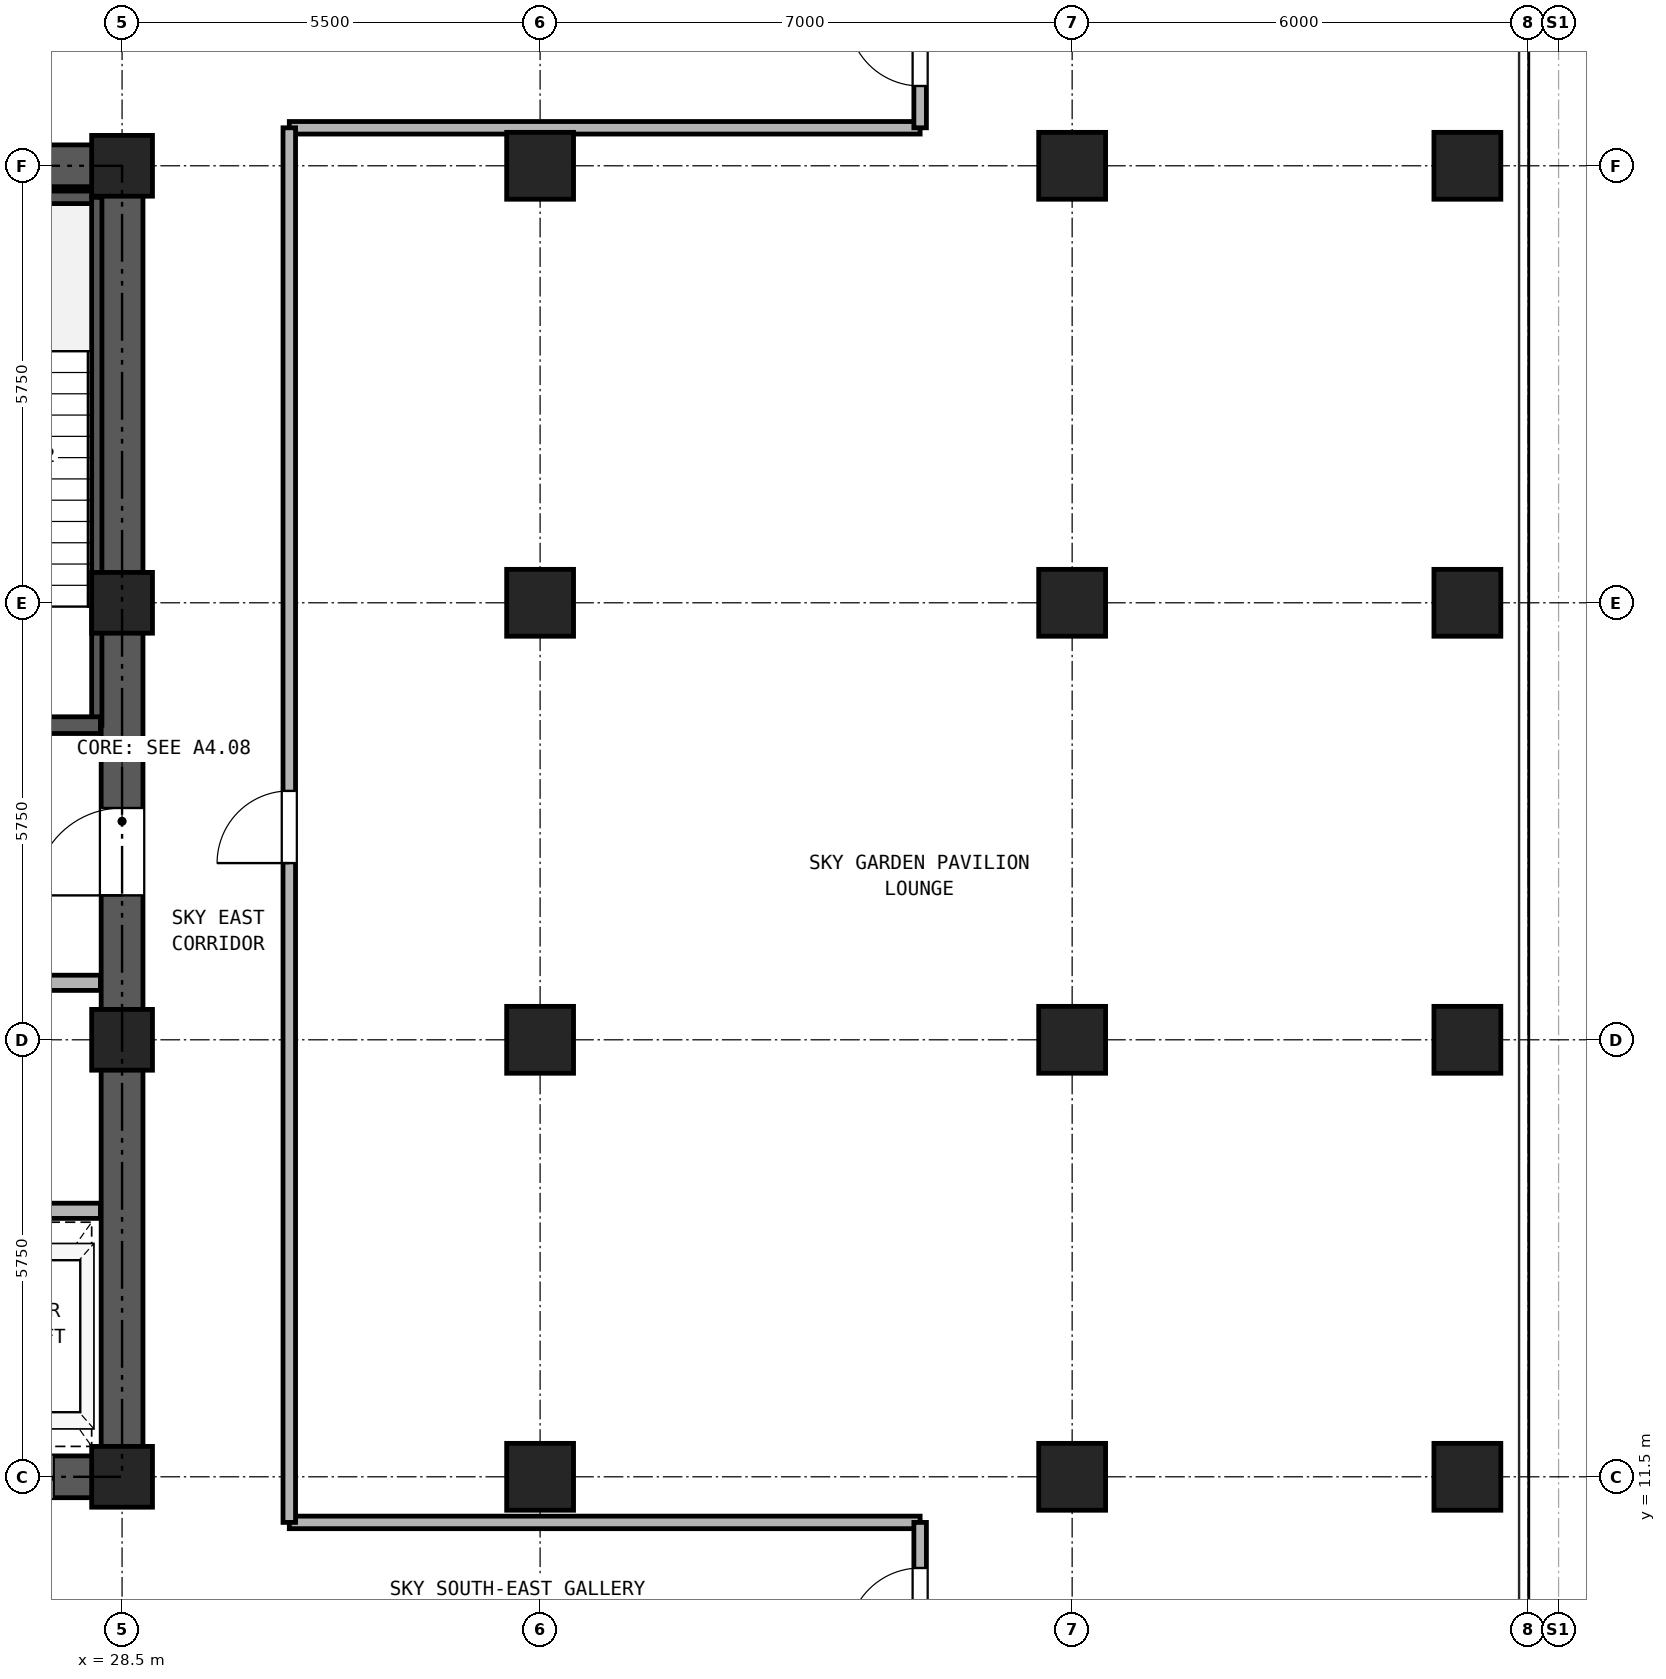
"""IFC4 building model, lengths in metres.
Left out: names, types, materials, properties, quantities, classifications, styles, units other than length and angle.
Written with IfcOpenShell. Run it as: python <this file> out.ifc"""

import sys

from ifc_helpers import new_model, si_unit, direction, frame, frame_2d, origin, origin_2d, place, context, subcontext, project, spatial, rectangle, hollow_rectangle, extrude, source, transform, mapped, element, fill, save


model = new_model("IFC4")
c1 = context("Model", 3, precision=1e-05, world=origin(), true_north=direction((0.0, 1.0)))
c2 = subcontext(c1, "Body", "Model", "MODEL_VIEW")
j1 = project(units=[si_unit("LENGTHUNIT", "METRE"), si_unit("PLANEANGLEUNIT", "RADIAN")], contexts=[c1])
p1 = place(None, origin())
s1 = spatial("IfcSite", under=j1, at=p1, CompositionType="ELEMENT")
p2 = place(p1, origin())
s2 = spatial("IfcBuilding", under=s1, at=p2, CompositionType="ELEMENT")
p3 = place(p2, frame((0.0, 0.0, 88.2)))
s3 = spatial("IfcBuildingStorey", under=s2, at=p3, CompositionType="ELEMENT", Elevation=88.2)
m1 = source(origin(), c2, "Body", "SweptSolid", [
    extrude(hollow_rectangle(XDim=0.88, YDim=0.88, WallThickness=0.05, at=origin_2d()), origin(), (0.0, 0.0, 1.0), 4.25),
])
for number, where, z_axis, x_axis in (
    (1, (46.2, 11.5, 0.0), (0.0, 0.0, 1.0), (1.0, 0.0, 0.0)),
    (2, (46.2, 17.25, 0.0), (0.0, 0.0, 1.0), (1.0, 0.0, 0.0)),
    (3, (46.2, 23.0, 0.0), (0.0, 0.0, 1.0), (1.0, 0.0, 0.0)),
    (4, (46.2, 28.75, 0.0), (0.0, 0.0, 1.0), (1.0, 0.0, 0.0)),
):
    element("IfcColumn", number, at=place(p3, frame(where, z_axis=z_axis, x_axis=x_axis)), inside=s3, PredefinedType="COLUMN", context=c2, shape_type="MappedRepresentation", body=[
        mapped(m1, transform((0.0, 0.0, 0.0), x_axis=(1.0, 0.0, 0.0), y_axis=(0.0, 1.0, 0.0), z_axis=(0.0, 0.0, 1.0), scale=1.0)),
    ])
m2 = source(origin(), c2, "Body", "SweptSolid", [
    extrude(hollow_rectangle(XDim=0.8, YDim=0.8, WallThickness=0.045, at=origin_2d()), origin(), (0.0, 0.0, 1.0), 4.25),
])
for number, where, z_axis, x_axis in (
    (5, (28.5, 11.5, 0.0), (0.0, 0.0, 1.0), (1.0, 0.0, 0.0)),
    (6, (28.5, 17.25, 0.0), (0.0, 0.0, 1.0), (1.0, 0.0, 0.0)),
    (7, (28.5, 23.0, 0.0), (0.0, 0.0, 1.0), (1.0, 0.0, 0.0)),
    (8, (28.5, 28.75, 0.0), (0.0, 0.0, 1.0), (1.0, 0.0, 0.0)),
):
    element("IfcColumn", number, at=place(p3, frame(where, z_axis=z_axis, x_axis=x_axis)), inside=s3, PredefinedType="COLUMN", context=c2, shape_type="MappedRepresentation", body=[
        mapped(m2, transform((0.0, 0.0, 0.0), x_axis=(1.0, 0.0, 0.0), y_axis=(0.0, 1.0, 0.0), z_axis=(0.0, 0.0, 1.0), scale=1.0)),
    ])
for number, where, z_axis, x_axis in (
    (9, (34.0, 11.5, 0.0), (0.0, 0.0, 1.0), (1.0, 0.0, 0.0)),
    (10, (34.0, 17.25, 0.0), (0.0, 0.0, 1.0), (1.0, 0.0, 0.0)),
    (11, (34.0, 23.0, 0.0), (0.0, 0.0, 1.0), (1.0, 0.0, 0.0)),
    (12, (34.0, 28.75, 0.0), (0.0, 0.0, 1.0), (1.0, 0.0, 0.0)),
    (13, (41.0, 11.5, 0.0), (0.0, 0.0, 1.0), (1.0, 0.0, 0.0)),
    (14, (41.0, 17.25, 0.0), (0.0, 0.0, 1.0), (1.0, 0.0, 0.0)),
    (15, (41.0, 23.0, 0.0), (0.0, 0.0, 1.0), (1.0, 0.0, 0.0)),
    (16, (41.0, 28.75, 0.0), (0.0, 0.0, 1.0), (1.0, 0.0, 0.0)),
):
    element("IfcColumn", number, at=place(p3, frame(where, z_axis=z_axis, x_axis=x_axis)), inside=s3, PredefinedType="COLUMN", context=c2, shape_type="MappedRepresentation", body=[
        mapped(m1, transform((0.0, 0.0, 0.0), x_axis=(1.0, 0.0, 0.0), y_axis=(0.0, 1.0, 0.0), z_axis=(0.0, 0.0, 1.0), scale=1.0)),
    ])
p4 = place(p3, frame((18.225, 11.5, 0.0), z_axis=(0.0, 0.0, 1.0), x_axis=(1.0, 0.0, 0.0)))
e17 = element("IfcWall", 17, at=p4, inside=s3, PredefinedType="SHEAR", context=c2, shape_type="SweptSolid", body=[
    extrude(rectangle(XDim=10.55, YDim=0.55, at=frame_2d((5.275, 0.0))), origin(), (0.0, 0.0, 1.0), 4.25),
])
p5 = place(p4, frame((1.145, 0.0, 0.0)))
e18 = element("IfcOpeningElement", 18, at=p5, cuts=e17, PredefinedType="OPENING", context=c2, shape_type="SweptSolid", body=[
    extrude(rectangle(XDim=1.1, YDim=2.25, at=frame_2d((0.55, 1.125))), frame((0.0, 0.285, 0.0), z_axis=(0.0, -1.0, 0.0), x_axis=(1.0, 0.0, 0.0)), (0.0, 0.0, 1.0), 0.57),
])
p6 = place(p4, frame((3.445, 0.0, 0.0)))
e19 = element("IfcOpeningElement", 19, at=p6, cuts=e17, PredefinedType="OPENING", context=c2, shape_type="SweptSolid", body=[
    extrude(rectangle(XDim=1.1, YDim=2.25, at=frame_2d((0.55, 1.125))), frame((0.0, 0.285, 0.0), z_axis=(0.0, -1.0, 0.0), x_axis=(1.0, 0.0, 0.0)), (0.0, 0.0, 1.0), 0.57),
])
p7 = place(p4, frame((5.875, 0.0, 0.0)))
e20 = element("IfcOpeningElement", 20, at=p7, cuts=e17, PredefinedType="OPENING", context=c2, shape_type="SweptSolid", body=[
    extrude(rectangle(XDim=1.1, YDim=2.25, at=frame_2d((0.55, 1.125))), frame((0.0, 0.285, 0.0), z_axis=(0.0, -1.0, 0.0), x_axis=(1.0, 0.0, 0.0)), (0.0, 0.0, 1.0), 0.57),
])
p8 = place(p4, frame((8.275, 0.0, 0.0)))
e21 = element("IfcOpeningElement", 21, at=p8, cuts=e17, PredefinedType="OPENING", context=c2, shape_type="SweptSolid", body=[
    extrude(rectangle(XDim=1.1, YDim=2.25, at=frame_2d((0.55, 1.125))), frame((0.0, 0.285, 0.0), z_axis=(0.0, -1.0, 0.0), x_axis=(1.0, 0.0, 0.0)), (0.0, 0.0, 1.0), 0.57),
])
p9 = place(p3, frame((18.225, 28.75, 0.0), z_axis=(0.0, 0.0, 1.0), x_axis=(1.0, 0.0, 0.0)))
e22 = element("IfcWall", 22, at=p9, inside=s3, PredefinedType="SHEAR", context=c2, shape_type="SweptSolid", body=[
    extrude(rectangle(XDim=10.55, YDim=0.55, at=frame_2d((5.275, 0.0))), origin(), (0.0, 0.0, 1.0), 4.25),
])
p10 = place(p9, frame((4.155, 0.0, 0.0)))
e23 = element("IfcOpeningElement", 23, at=p10, cuts=e22, PredefinedType="OPENING", context=c2, shape_type="SweptSolid", body=[
    extrude(rectangle(XDim=0.9, YDim=2.05, at=frame_2d((0.45, 1.025))), frame((0.0, 0.285, 0.0), z_axis=(0.0, -1.0, 0.0), x_axis=(1.0, 0.0, 0.0)), (0.0, 0.0, 1.0), 0.57),
])
p11 = place(p9, frame((5.695, 0.0, 0.0)))
e24 = element("IfcOpeningElement", 24, at=p11, cuts=e22, PredefinedType="OPENING", context=c2, shape_type="SweptSolid", body=[
    extrude(rectangle(XDim=0.9, YDim=2.05, at=frame_2d((0.45, 1.025))), frame((0.0, 0.285, 0.0), z_axis=(0.0, -1.0, 0.0), x_axis=(1.0, 0.0, 0.0)), (0.0, 0.0, 1.0), 0.57),
])
p12 = place(p3, frame((28.5, 11.775, 0.0), z_axis=(0.0, 0.0, 1.0), x_axis=(0.0, 1.0, 0.0)))
e25 = element("IfcWall", 25, at=p12, inside=s3, PredefinedType="SHEAR", context=c2, shape_type="SweptSolid", body=[
    extrude(rectangle(XDim=16.7, YDim=0.55, at=frame_2d((8.35, 0.0))), origin(), (0.0, 0.0, 1.0), 4.25),
])
p13 = place(p12, frame((7.375, 0.0, 0.0)))
e26 = element("IfcOpeningElement", 26, at=p13, cuts=e25, PredefinedType="OPENING", context=c2, shape_type="SweptSolid", body=[
    extrude(rectangle(XDim=1.15, YDim=2.2, at=frame_2d((0.575, 1.1))), frame((0.0, 0.285, 0.0), z_axis=(0.0, -1.0, 0.0), x_axis=(1.0, 0.0, 0.0)), (0.0, 0.0, 1.0), 0.57),
])
p14 = place(p3, frame((25.13, 28.335, 0.0), z_axis=(0.0, 0.0, 1.0), x_axis=(1.0, 0.0, 0.0)))
e27 = element("IfcWall", 27, at=p14, inside=s3, PredefinedType="PARTITIONING", context=c2, shape_type="SweptSolid", body=[
    extrude(rectangle(XDim=3.085, YDim=0.165, at=frame_2d((1.542, 0.0))), origin(), (0.0, 0.0, 1.0), 4.25),
])
p15 = place(p3, frame((28.167, 21.39, 0.0), z_axis=(0.0, 0.0, 1.0), x_axis=(0.0, 1.0, 0.0)))
e28 = element("IfcWall", 28, at=p15, inside=s3, PredefinedType="PARTITIONING", context=c2, shape_type="SweptSolid", body=[
    extrude(rectangle(XDim=6.945, YDim=0.135, at=frame_2d((3.473, 0.0))), origin(), (0.0, 0.0, 1.0), 4.25),
])
p16 = place(p3, frame((25.13, 21.39, 0.0), z_axis=(0.0, 0.0, 1.0), x_axis=(1.0, 0.0, 0.0)))
e29 = element("IfcWall", 29, at=p16, inside=s3, PredefinedType="SOLIDWALL", context=c2, shape_type="SweptSolid", body=[
    extrude(rectangle(XDim=3.085, YDim=0.22, at=frame_2d((1.542, 0.0))), origin(), (0.0, 0.0, 1.0), 4.25),
])
p17 = place(p16, frame((0.92, 0.0, 0.0)))
e30 = element("IfcOpeningElement", 30, at=p17, cuts=e29, PredefinedType="OPENING", context=c2, shape_type="SweptSolid", body=[
    extrude(rectangle(XDim=1.15, YDim=2.2, at=frame_2d((0.575, 1.1))), frame((0.0, 0.12, 0.0), z_axis=(0.0, -1.0, 0.0), x_axis=(1.0, 0.0, 0.0)), (0.0, 0.0, 1.0), 0.24),
])
p18 = place(p3, frame((18.785, 18.0, 0.0), z_axis=(0.0, 0.0, 1.0), x_axis=(1.0, 0.0, 0.0)))
e31 = element("IfcWall", 31, at=p18, inside=s3, PredefinedType="PARTITIONING", context=c2, shape_type="SweptSolid", body=[
    extrude(rectangle(XDim=9.43, YDim=0.2, at=frame_2d((4.715, 0.0))), origin(), (0.0, 0.0, 1.0), 4.25),
])
p19 = place(p18, frame((0.465, 0.0, 0.0)))
e32 = element("IfcOpeningElement", 32, at=p19, cuts=e31, PredefinedType="OPENING", context=c2, shape_type="SweptSolid", body=[
    extrude(rectangle(XDim=1.3, YDim=2.3, at=frame_2d((0.65, 1.15))), frame((0.0, 0.11, 0.0), z_axis=(0.0, -1.0, 0.0), x_axis=(1.0, 0.0, 0.0)), (0.0, 0.0, 1.0), 0.22),
])
p20 = place(p18, frame((2.565, 0.0, 0.0)))
e33 = element("IfcOpeningElement", 33, at=p20, cuts=e31, PredefinedType="OPENING", context=c2, shape_type="SweptSolid", body=[
    extrude(rectangle(XDim=1.3, YDim=2.3, at=frame_2d((0.65, 1.15))), frame((0.0, 0.11, 0.0), z_axis=(0.0, -1.0, 0.0), x_axis=(1.0, 0.0, 0.0)), (0.0, 0.0, 1.0), 0.22),
])
p21 = place(p18, frame((7.065, 0.0, 0.0)))
e34 = element("IfcOpeningElement", 34, at=p21, cuts=e31, PredefinedType="OPENING", context=c2, shape_type="SweptSolid", body=[
    extrude(rectangle(XDim=1.0, YDim=2.15, at=frame_2d((0.5, 1.075))), frame((0.0, 0.11, 0.0), z_axis=(0.0, -1.0, 0.0), x_axis=(1.0, 0.0, 0.0)), (0.0, 0.0, 1.0), 0.22),
])
p22 = place(p3, frame((18.785, 15.0, 0.0), z_axis=(0.0, 0.0, 1.0), x_axis=(1.0, 0.0, 0.0)))
e35 = element("IfcWall", 35, at=p22, inside=s3, PredefinedType="PARTITIONING", context=c2, shape_type="SweptSolid", body=[
    extrude(rectangle(XDim=9.43, YDim=0.2, at=frame_2d((4.715, 0.0))), origin(), (0.0, 0.0, 1.0), 4.25),
])
for number, where, z_axis, x_axis in (
    (36, (30.7, 10.9, 0.0), (0.0, 0.0, 1.0), (1.0, 0.0, 0.0)),
    (37, (30.7, 29.25, 0.0), (0.0, 0.0, 1.0), (1.0, 0.0, 0.0)),
):
    element("IfcWall", number, at=place(p3, frame(where, z_axis=z_axis, x_axis=x_axis)), inside=s3, PredefinedType="PARTITIONING", context=c2, shape_type="SweptSolid", body=[
        extrude(rectangle(XDim=8.3, YDim=0.165, at=frame_2d((4.15, 0.0))), origin(), (0.0, 0.0, 1.0), 4.25),
    ])
p23 = place(p3, frame((30.7, 10.9, 0.0), z_axis=(0.0, 0.0, 1.0), x_axis=(0.0, 1.0, 0.0)))
e38 = element("IfcWall", 38, at=p23, inside=s3, PredefinedType="PARTITIONING", context=c2, shape_type="SweptSolid", body=[
    extrude(rectangle(XDim=18.35, YDim=0.165, at=frame_2d((9.175, 0.0))), origin(), (0.0, 0.0, 1.0), 4.25),
])
p24 = place(p23, frame((8.675, 0.0, 0.0)))
e39 = element("IfcOpeningElement", 39, at=p24, cuts=e38, PredefinedType="OPENING", context=c2, shape_type="SweptSolid", body=[
    extrude(rectangle(XDim=0.95, YDim=2.15, at=frame_2d((0.475, 1.075))), frame((0.0, 0.093, 0.0), z_axis=(0.0, -1.0, 0.0), x_axis=(1.0, 0.0, 0.0)), (0.0, 0.0, 1.0), 0.185),
])
p25 = place(p3, frame((39.0, 0.16, 0.0), z_axis=(0.0, 0.0, 1.0), x_axis=(0.0, 1.0, 0.0)))
e40 = element("IfcWall", 40, at=p25, inside=s3, PredefinedType="PARTITIONING", context=c2, shape_type="SweptSolid", body=[
    extrude(rectangle(XDim=10.74, YDim=0.165, at=frame_2d((5.37, 0.0))), origin(), (0.0, 0.0, 1.0), 4.25),
])
p26 = place(p25, frame((9.19, 0.0, 0.0)))
e41 = element("IfcOpeningElement", 41, at=p26, cuts=e40, PredefinedType="OPENING", context=c2, shape_type="SweptSolid", body=[
    extrude(rectangle(XDim=0.95, YDim=2.15, at=frame_2d((0.475, 1.075))), frame((0.0, 0.093, 0.0), z_axis=(0.0, -1.0, 0.0), x_axis=(1.0, 0.0, 0.0)), (0.0, 0.0, 1.0), 0.185),
])
p27 = place(p3, frame((39.0, 29.25, 0.0), z_axis=(0.0, 0.0, 1.0), x_axis=(0.0, 1.0, 0.0)))
e42 = element("IfcWall", 42, at=p27, inside=s3, PredefinedType="PARTITIONING", context=c2, shape_type="SweptSolid", body=[
    extrude(rectangle(XDim=5.89, YDim=0.165, at=frame_2d((2.945, 0.0))), origin(), (0.0, 0.0, 1.0), 4.25),
])
p28 = place(p27, frame((0.55, 0.0, 0.0)))
e43 = element("IfcOpeningElement", 43, at=p28, cuts=e42, PredefinedType="OPENING", context=c2, shape_type="SweptSolid", body=[
    extrude(rectangle(XDim=0.95, YDim=2.15, at=frame_2d((0.475, 1.075))), frame((0.0, 0.093, 0.0), z_axis=(0.0, -1.0, 0.0), x_axis=(1.0, 0.0, 0.0)), (0.0, 0.0, 1.0), 0.185),
])
p29 = place(p13, origin())
e44 = element("IfcDoor", 44, at=p29, inside=s3, OperationType="SINGLE_SWING_LEFT", PredefinedType="DOOR", context=c2, shape_type="SweptSolid", body=[
    extrude(rectangle(XDim=1.15, YDim=2.2, at=frame_2d((0.575, 1.1))), frame((0.0, 0.025, 0.0), z_axis=(0.0, -1.0, 0.0), x_axis=(1.0, 0.0, 0.0)), (0.0, 0.0, 1.0), 0.05),
])
fill(e26, e44)
p30 = place(p8, frame((1.1, 0.0, 0.0), z_axis=(0.0, 0.0, 1.0), x_axis=(-1.0, 0.0, 0.0)))
e45 = element("IfcDoor", 45, at=p30, inside=s3, OperationType="DOUBLE_DOOR_SLIDING", PredefinedType="DOOR", context=c2, shape_type="SweptSolid", body=[
    extrude(rectangle(XDim=1.1, YDim=2.25, at=frame_2d((0.55, 1.125))), frame((0.0, 0.025, 0.0), z_axis=(0.0, -1.0, 0.0), x_axis=(1.0, 0.0, 0.0)), (0.0, 0.0, 1.0), 0.05),
])
fill(e21, e45)
p31 = place(p26, origin())
e46 = element("IfcDoor", 46, at=p31, inside=s3, OperationType="SINGLE_SWING_LEFT", PredefinedType="DOOR", context=c2, shape_type="SweptSolid", body=[
    extrude(rectangle(XDim=0.95, YDim=2.15, at=frame_2d((0.475, 1.075))), frame((0.0, 0.025, 0.0), z_axis=(0.0, -1.0, 0.0), x_axis=(1.0, 0.0, 0.0)), (0.0, 0.0, 1.0), 0.05),
])
fill(e41, e46)
p32 = place(p28, origin())
e47 = element("IfcDoor", 47, at=p32, inside=s3, OperationType="SINGLE_SWING_RIGHT", PredefinedType="DOOR", context=c2, shape_type="SweptSolid", body=[
    extrude(rectangle(XDim=0.95, YDim=2.15, at=frame_2d((0.475, 1.075))), frame((0.0, 0.025, 0.0), z_axis=(0.0, -1.0, 0.0), x_axis=(1.0, 0.0, 0.0)), (0.0, 0.0, 1.0), 0.05),
])
fill(e43, e47)
p33 = place(p24, origin())
e48 = element("IfcDoor", 48, at=p33, inside=s3, OperationType="SINGLE_SWING_LEFT", PredefinedType="DOOR", context=c2, shape_type="SweptSolid", body=[
    extrude(rectangle(XDim=0.95, YDim=2.15, at=frame_2d((0.475, 1.075))), frame((0.0, 0.025, 0.0), z_axis=(0.0, -1.0, 0.0), x_axis=(1.0, 0.0, 0.0)), (0.0, 0.0, 1.0), 0.05),
])
fill(e39, e48)
save(model, sys.argv[1])
